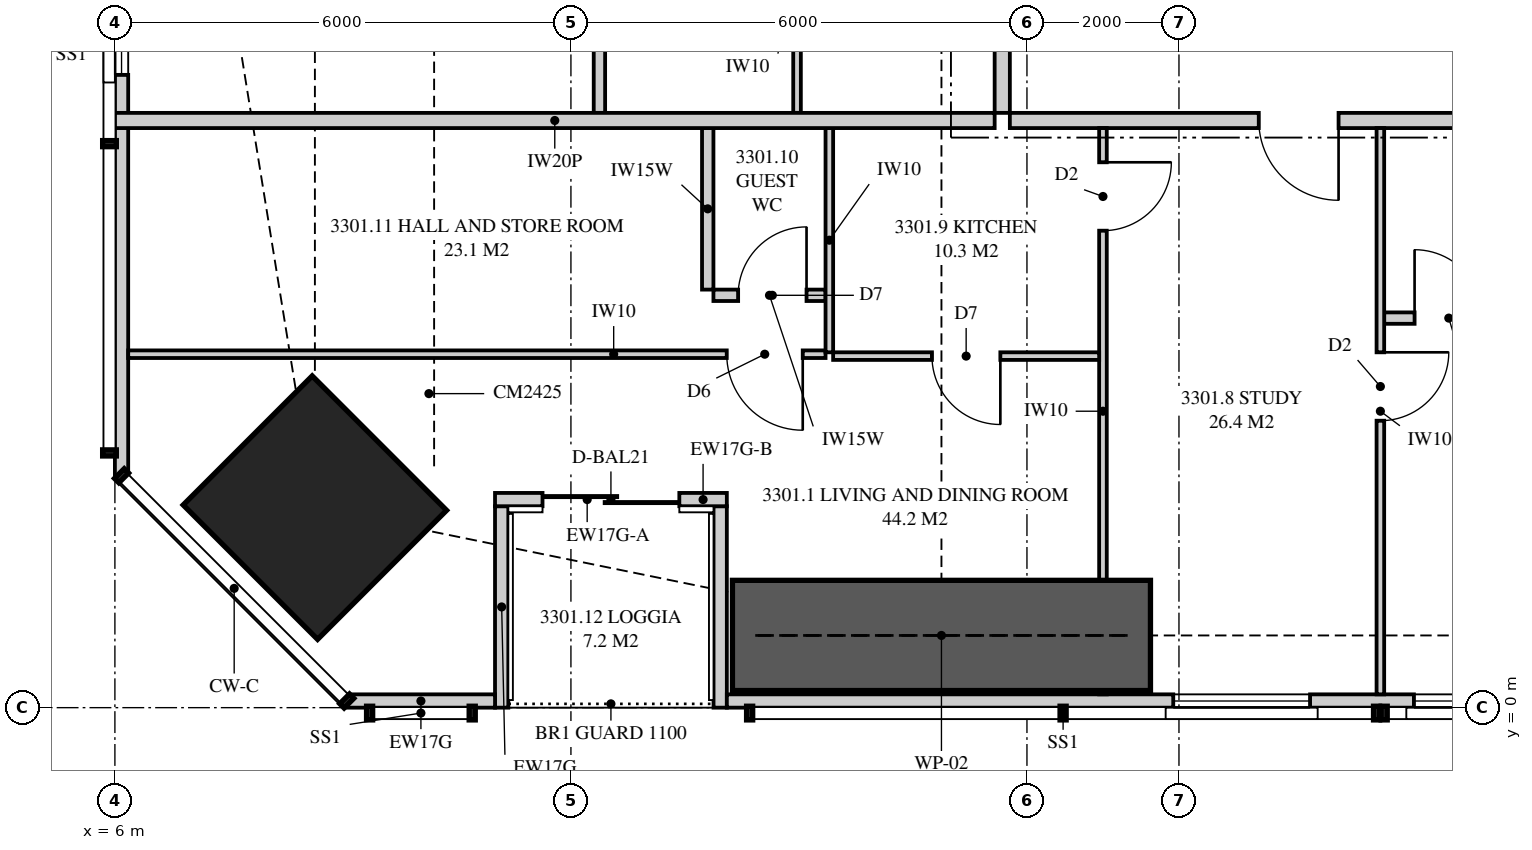
"""IFC4 building model, lengths in metres.
Left out: names, types, materials, properties, quantities, classifications, styles, units other than length and angle.
Written with IfcOpenShell. Run it as: python <this file> out.ifc"""

import sys

from ifc_helpers import new_model, si_unit, direction, frame, frame_2d, origin, origin_2d, place, context, subcontext, project, spatial, polyline, rectangle, outline, extrude, element, fill, save


model = new_model("IFC4")
c1 = context("Model", 3, precision=1e-05, world=origin(), true_north=direction((0.0, 1.0)))
c2 = subcontext(c1, "Body", "Model", "MODEL_VIEW")
j1 = project(units=[si_unit("LENGTHUNIT", "METRE"), si_unit("PLANEANGLEUNIT", "RADIAN")], contexts=[c1])
p1 = place(None, origin())
s1 = spatial("IfcSite", under=j1, at=p1, CompositionType="ELEMENT")
p2 = place(p1, origin())
s2 = spatial("IfcBuilding", under=s1, at=p2, CompositionType="ELEMENT")
p3 = place(p2, frame((0.0, 0.0, 121.6)))
s3 = spatial("IfcBuildingStorey", under=s2, at=p3, CompositionType="ELEMENT", Elevation=121.6)
p4 = place(p3, frame((8.631, 2.631, 0.0), z_axis=(0.0, 0.0, 1.0), x_axis=(0.707106781187, 0.707106781187, 0.0)))
e1 = element("IfcColumn", 1, at=p4, inside=s3, PredefinedType="COLUMN", context=c2, shape_type="SweptSolid", body=[
    extrude(rectangle(XDim=2.4, YDim=2.5, at=origin_2d()), origin(), (0.0, 0.0, 1.0), 3.35),
])
p5 = place(p3, frame((9.051, 0.087, 0.0), z_axis=(0.0, 0.0, 1.0), x_axis=(1.0, 0.0, 0.0)))
e2 = element("IfcWall", 2, at=p5, inside=s3, PredefinedType="SOLIDWALL", context=c2, shape_type="SweptSolid", body=[
    extrude(rectangle(XDim=1.95, YDim=0.175, at=frame_2d((0.975, 0.0))), origin(), (0.0, 0.0, 1.0), 3.11),
])
p6 = place(p3, frame((14.051, 0.087, 0.0), z_axis=(0.0, 0.0, 1.0), x_axis=(1.0, 0.0, 0.0)))
e3 = element("IfcWall", 3, at=p6, inside=s3, PredefinedType="SOLIDWALL", context=c2, shape_type="SweptSolid", body=[
    extrude(outline(polyline([(0.0, 0.0), (27.374, 0.0), (27.374, 3.11), (24.777, 3.11), (24.777, 2.15), (24.732, 2.15), (24.732, 3.11), (24.574, 3.11), (24.574, 2.15), (2.824, 2.15), (2.824, 3.11), (2.666, 3.11), (2.666, 2.15), (2.62, 2.15), (2.62, 3.11), (0.0, 3.11), (0.0, 0.0)])), frame((0.0, 0.087, 0.0), z_axis=(0.0, -1.0, 0.0), x_axis=(1.0, 0.0, 0.0)), (0.0, 0.0, 1.0), 0.175),
])
p7 = place(p6, frame((5.874, 0.0, 0.4)))
e4 = element("IfcOpeningElement", 4, at=p7, cuts=e3, PredefinedType="OPENING", context=c2, shape_type="SweptSolid", body=[
    extrude(rectangle(XDim=1.8, YDim=1.7, at=frame_2d((0.9, 0.85))), frame((0.0, 0.097, 0.0), z_axis=(0.0, -1.0, 0.0), x_axis=(1.0, 0.0, 0.0)), (0.0, 0.0, 1.0), 0.195),
])
p8 = place(p6, frame((9.04, 0.0, 0.4)))
e5 = element("IfcOpeningElement", 5, at=p8, cuts=e3, PredefinedType="OPENING", context=c2, shape_type="SweptSolid", body=[
    extrude(rectangle(XDim=1.8, YDim=1.7, at=frame_2d((0.9, 0.85))), frame((0.0, 0.097, 0.0), z_axis=(0.0, -1.0, 0.0), x_axis=(1.0, 0.0, 0.0)), (0.0, 0.0, 1.0), 0.195),
])
p9 = place(p6, frame((16.564, 0.0, 0.4)))
e6 = element("IfcOpeningElement", 6, at=p9, cuts=e3, PredefinedType="OPENING", context=c2, shape_type="SweptSolid", body=[
    extrude(rectangle(XDim=1.8, YDim=1.7, at=frame_2d((0.9, 0.85))), frame((0.0, 0.097, 0.0), z_axis=(0.0, -1.0, 0.0), x_axis=(1.0, 0.0, 0.0)), (0.0, 0.0, 1.0), 0.195),
])
p10 = place(p6, frame((19.889, 0.0, 0.4)))
e7 = element("IfcOpeningElement", 7, at=p10, cuts=e3, PredefinedType="OPENING", context=c2, shape_type="SweptSolid", body=[
    extrude(rectangle(XDim=1.8, YDim=1.7, at=frame_2d((0.9, 0.85))), frame((0.0, 0.097, 0.0), z_axis=(0.0, -1.0, 0.0), x_axis=(1.0, 0.0, 0.0)), (0.0, 0.0, 1.0), 0.195),
])
p11 = place(p3, frame((11.001, 2.738, 0.0), z_axis=(0.0, 0.0, 1.0), x_axis=(1.0, 0.0, 0.0)))
e8 = element("IfcWall", 8, at=p11, inside=s3, PredefinedType="SOLIDWALL", context=c2, shape_type="SweptSolid", body=[
    extrude(rectangle(XDim=2.425, YDim=0.175, at=frame_2d((1.212, 0.0))), origin(), (0.0, 0.0, 1.0), 2.15),
])
p12 = place(p11, frame((0.625, 0.0, 0.0)))
e9 = element("IfcOpeningElement", 9, at=p12, cuts=e8, PredefinedType="OPENING", context=c2, shape_type="SweptSolid", body=[
    extrude(rectangle(XDim=1.8, YDim=2.1, at=frame_2d((0.9, 1.05))), frame((0.0, 0.097, 0.0), z_axis=(0.0, -1.0, 0.0), x_axis=(1.0, 0.0, 0.0)), (0.0, 0.0, 1.0), 0.195),
])
p13 = place(p3, frame((13.426, 2.738, 0.0), z_axis=(0.0, 0.0, 1.0), x_axis=(1.0, 0.0, 0.0)))
e10 = element("IfcWall", 10, at=p13, inside=s3, PredefinedType="SOLIDWALL", context=c2, shape_type="SweptSolid", body=[
    extrude(rectangle(XDim=0.625, YDim=0.175, at=frame_2d((0.312, 0.0))), origin(), (0.0, 0.0, 1.0), 3.11),
])
p14 = place(p3, frame((11.089, 0.0, 0.0), z_axis=(0.0, 0.0, 1.0), x_axis=(0.0, 1.0, 0.0)))
e11 = element("IfcWall", 11, at=p14, inside=s3, PredefinedType="SOLIDWALL", context=c2, shape_type="SweptSolid", body=[
    extrude(outline(polyline([(0.0, 0.0), (2.65, 0.0), (2.65, 2.15), (1.296, 2.15), (1.296, 3.11), (0.0, 3.11), (0.0, 0.0)])), frame((0.0, 0.087, 0.0), z_axis=(0.0, -1.0, 0.0), x_axis=(1.0, 0.0, 0.0)), (0.0, 0.0, 1.0), 0.175),
])
p15 = place(p3, frame((13.964, 0.0, 0.0), z_axis=(0.0, 0.0, 1.0), x_axis=(0.0, 1.0, 0.0)))
e12 = element("IfcWall", 12, at=p15, inside=s3, PredefinedType="SOLIDWALL", context=c2, shape_type="SweptSolid", body=[
    extrude(outline(polyline([(0.0, 0.0), (2.65, 0.0), (2.65, 3.11), (2.378, 3.11), (2.378, 2.15), (0.709, 2.15), (0.709, 3.11), (0.0, 3.11), (0.0, 0.0)])), frame((0.0, 0.087, 0.0), z_axis=(0.0, -1.0, 0.0), x_axis=(1.0, 0.0, 0.0)), (0.0, 0.0, 1.0), 0.175),
])
p16 = place(p3, frame((6.087, 17.358, 0.0), z_axis=(0.0, 0.0, 1.0), x_axis=(0.0, -1.0, 0.0)))
e13 = element("IfcWall", 13, at=p16, inside=s3, PredefinedType="SOLIDWALL", context=c2, shape_type="SweptSolid", body=[
    extrude(outline(polyline([(0.0, 0.0), (14.307, 0.0), (14.307, 3.11), (4.577, 3.11), (4.577, 2.15), (4.484, 2.15), (4.484, 3.11), (4.358, 3.11), (4.358, 2.15), (0.0, 2.15), (0.0, 0.0)])), frame((0.0, 0.087, 0.0), z_axis=(0.0, -1.0, 0.0), x_axis=(1.0, 0.0, 0.0)), (0.0, 0.0, 1.0), 0.175),
])
p17 = place(p16, frame((0.3, 0.0, 0.4)))
e14 = element("IfcOpeningElement", 14, at=p17, cuts=e13, PredefinedType="OPENING", context=c2, shape_type="SweptSolid", body=[
    extrude(rectangle(XDim=1.2, YDim=1.7, at=frame_2d((0.6, 0.85))), frame((0.0, 0.097, 0.0), z_axis=(0.0, -1.0, 0.0), x_axis=(1.0, 0.0, 0.0)), (0.0, 0.0, 1.0), 0.195),
])
p18 = place(p16, frame((7.233, 0.0, 0.4)))
e15 = element("IfcOpeningElement", 15, at=p18, cuts=e13, PredefinedType="OPENING", context=c2, shape_type="SweptSolid", body=[
    extrude(rectangle(XDim=1.8, YDim=1.7, at=frame_2d((0.9, 0.85))), frame((0.0, 0.097, 0.0), z_axis=(0.0, -1.0, 0.0), x_axis=(1.0, 0.0, 0.0)), (0.0, 0.0, 1.0), 0.195),
])
p19 = place(p3, frame((17.775, 7.725, 0.0), z_axis=(0.0, 0.0, 1.0), x_axis=(1.0, 0.0, 0.0)))
e16 = element("IfcWall", 16, at=p19, inside=s3, PredefinedType="PARTITIONING", context=c2, shape_type="SweptSolid", body=[
    extrude(outline(polyline([(0.0, 0.0), (19.225, 0.0), (19.225, 3.11), (10.312, 3.11), (10.312, 2.541), (9.638, 2.541), (9.638, 3.11), (0.0, 3.11), (0.0, 0.0)])), frame((0.0, 0.1, 0.0), z_axis=(0.0, -1.0, 0.0), x_axis=(1.0, 0.0, 0.0)), (0.0, 0.0, 1.0), 0.2),
])
p20 = place(p19, frame((3.275, 0.0, 0.0)))
e17 = element("IfcOpeningElement", 17, at=p20, cuts=e16, PredefinedType="OPENING", context=c2, shape_type="SweptSolid", body=[
    extrude(rectangle(XDim=1.05, YDim=2.2, at=frame_2d((0.525, 1.1))), frame((0.0, 0.11, 0.0), z_axis=(0.0, -1.0, 0.0), x_axis=(1.0, 0.0, 0.0)), (0.0, 0.0, 1.0), 0.22),
])
p21 = place(p3, frame((22.65, 0.175, 0.0), z_axis=(0.0, 0.0, 1.0), x_axis=(0.0, 1.0, 0.0)))
e18 = element("IfcWall", 18, at=p21, inside=s3, PredefinedType="PARTITIONING", context=c2, shape_type="SweptSolid", body=[
    extrude(outline(polyline([(0.0, 0.0), (7.45, 0.0), (7.45, 3.11), (1.635, 3.11), (1.635, 2.15), (0.0, 2.15), (0.0, 3.11), (0.0, 0.0)])), frame((0.0, 0.05, 0.0), z_axis=(0.0, -1.0, 0.0), x_axis=(1.0, 0.0, 0.0)), (0.0, 0.0, 1.0), 0.1),
])
p22 = place(p21, frame((3.6, 0.0, 0.0)))
e19 = element("IfcOpeningElement", 19, at=p22, cuts=e18, PredefinedType="OPENING", context=c2, shape_type="SweptSolid", body=[
    extrude(rectangle(XDim=0.9, YDim=2.1, at=frame_2d((0.45, 1.05))), frame((0.0, 0.06, 0.0), z_axis=(0.0, -1.0, 0.0), x_axis=(1.0, 0.0, 0.0)), (0.0, 0.0, 1.0), 0.12),
])
p23 = place(p3, frame((22.7, 5.125, 0.0), z_axis=(0.0, 0.0, 1.0), x_axis=(1.0, 0.0, 0.0)))
e20 = element("IfcWall", 20, at=p23, inside=s3, PredefinedType="PLUMBINGWALL", context=c2, shape_type="SweptSolid", body=[
    extrude(rectangle(XDim=4.15, YDim=0.15, at=frame_2d((2.075, 0.0))), origin(), (0.0, 0.0, 1.0), 3.11),
])
p24 = place(p23, frame((0.4, 0.0, 0.0)))
e21 = element("IfcOpeningElement", 21, at=p24, cuts=e20, PredefinedType="OPENING", context=c2, shape_type="SweptSolid", body=[
    extrude(rectangle(XDim=0.9, YDim=2.1, at=frame_2d((0.45, 1.05))), frame((0.0, 0.085, 0.0), z_axis=(0.0, -1.0, 0.0), x_axis=(1.0, 0.0, 0.0)), (0.0, 0.0, 1.0), 0.17),
])
p25 = place(p3, frame((19.0, 0.175, 0.0), z_axis=(0.0, 0.0, 1.0), x_axis=(0.0, 1.0, 0.0)))
e22 = element("IfcWall", 22, at=p25, inside=s3, PredefinedType="PARTITIONING", context=c2, shape_type="SweptSolid", body=[
    extrude(outline(polyline([(0.529, 2.15), (0.0, 2.15), (0.0, 0.0), (0.529, 0.0), (0.529, 0.017), (1.021, 0.017), (1.021, 0.0), (7.45, 0.0), (7.45, 3.11), (1.635, 3.11), (1.635, 2.15), (1.021, 2.15), (1.021, 2.133), (0.529, 2.133), (0.529, 2.15)])), frame((0.0, 0.05, 0.0), z_axis=(0.0, -1.0, 0.0), x_axis=(1.0, 0.0, 0.0)), (0.0, 0.0, 1.0), 0.1),
])
p26 = place(p25, frame((6.1, 0.0, 0.0)))
e23 = element("IfcOpeningElement", 23, at=p26, cuts=e22, PredefinedType="OPENING", context=c2, shape_type="SweptSolid", body=[
    extrude(rectangle(XDim=0.9, YDim=2.1, at=frame_2d((0.45, 1.05))), frame((0.0, 0.06, 0.0), z_axis=(0.0, -1.0, 0.0), x_axis=(1.0, 0.0, 0.0)), (0.0, 0.0, 1.0), 0.12),
])
p27 = place(p3, frame((15.45, 4.625, 0.0), z_axis=(0.0, 0.0, 1.0), x_axis=(1.0, 0.0, 0.0)))
e24 = element("IfcWall", 24, at=p27, inside=s3, PredefinedType="PARTITIONING", context=c2, shape_type="SweptSolid", body=[
    extrude(outline(polyline([(0.0, 0.0), (3.5, 0.0), (3.5, 3.11), (1.712, 3.11), (1.712, 2.541), (1.138, 2.541), (1.138, 3.11), (0.0, 3.11), (0.0, 0.0)])), frame((0.0, 0.05, 0.0), z_axis=(0.0, -1.0, 0.0), x_axis=(1.0, 0.0, 0.0)), (0.0, 0.0, 1.0), 0.1),
])
p28 = place(p27, frame((1.3, 0.0, 0.0)))
e25 = element("IfcOpeningElement", 25, at=p28, cuts=e24, PredefinedType="OPENING", context=c2, shape_type="SweptSolid", body=[
    extrude(rectangle(XDim=0.9, YDim=2.1, at=frame_2d((0.45, 1.05))), frame((0.0, 0.06, 0.0), z_axis=(0.0, -1.0, 0.0), x_axis=(1.0, 0.0, 0.0)), (0.0, 0.0, 1.0), 0.12),
])
p29 = place(p3, frame((15.4, 4.675, 0.0), z_axis=(0.0, 0.0, 1.0), x_axis=(0.0, 1.0, 0.0)))
e26 = element("IfcWall", 26, at=p29, inside=s3, PredefinedType="PARTITIONING", context=c2, shape_type="SweptSolid", body=[
    extrude(rectangle(XDim=2.95, YDim=0.1, at=frame_2d((1.475, 0.0))), origin(), (0.0, 0.0, 1.0), 3.11),
])
p30 = place(p3, frame((13.875, 5.425, 0.0), z_axis=(0.0, 0.0, 1.0), x_axis=(1.0, 0.0, 0.0)))
e27 = element("IfcWall", 27, at=p30, inside=s3, PredefinedType="PLUMBINGWALL", context=c2, shape_type="SweptSolid", body=[
    extrude(rectangle(XDim=1.475, YDim=0.15, at=frame_2d((0.738, 0.0))), origin(), (0.0, 0.0, 1.0), 3.11),
])
p31 = place(p30, frame((0.325, 0.0, 0.0)))
e28 = element("IfcOpeningElement", 28, at=p31, cuts=e27, PredefinedType="OPENING", context=c2, shape_type="SweptSolid", body=[
    extrude(rectangle(XDim=0.9, YDim=2.1, at=frame_2d((0.45, 1.05))), frame((0.0, 0.085, 0.0), z_axis=(0.0, -1.0, 0.0), x_axis=(1.0, 0.0, 0.0)), (0.0, 0.0, 1.0), 0.17),
])
p32 = place(p3, frame((13.8, 5.5, 0.0), z_axis=(0.0, 0.0, 1.0), x_axis=(0.0, 1.0, 0.0)))
e29 = element("IfcWall", 29, at=p32, inside=s3, PredefinedType="PLUMBINGWALL", context=c2, shape_type="SweptSolid", body=[
    extrude(rectangle(XDim=2.125, YDim=0.15, at=frame_2d((1.062, 0.0))), origin(), (0.0, 0.0, 1.0), 3.11),
])
p33 = place(p3, frame((6.175, 4.65, 0.0), z_axis=(0.0, 0.0, 1.0), x_axis=(1.0, 0.0, 0.0)))
e30 = element("IfcWall", 30, at=p33, inside=s3, PredefinedType="PARTITIONING", context=c2, shape_type="SweptSolid", body=[
    extrude(outline(polyline([(0.0, 0.0), (9.175, 0.0), (9.175, 3.11), (5.285, 3.11), (5.285, 2.51), (3.0, 2.51), (3.0, 2.15), (1.258, 2.15), (1.258, 3.11), (0.0, 3.11), (0.0, 0.0)])), frame((0.0, 0.05, 0.0), z_axis=(0.0, -1.0, 0.0), x_axis=(1.0, 0.0, 0.0)), (0.0, 0.0, 1.0), 0.1),
])
p34 = place(p33, frame((7.875, 0.0, 0.0)))
e31 = element("IfcOpeningElement", 31, at=p34, cuts=e30, PredefinedType="OPENING", context=c2, shape_type="SweptSolid", body=[
    extrude(rectangle(XDim=1.0, YDim=2.1, at=frame_2d((0.5, 1.05))), frame((0.0, 0.06, 0.0), z_axis=(0.0, -1.0, 0.0), x_axis=(1.0, 0.0, 0.0)), (0.0, 0.0, 1.0), 0.12),
])
p35 = place(p3, frame((6.0, 7.725, 0.0), z_axis=(0.0, 0.0, 1.0), x_axis=(1.0, 0.0, 0.0)))
e32 = element("IfcWall", 32, at=p35, inside=s3, PredefinedType="PARTITIONING", context=c2, shape_type="SweptSolid", body=[
    extrude(outline(polyline([(0.0, 0.0), (11.575, 0.0), (11.575, 3.11), (11.212, 3.11), (11.212, 2.541), (10.538, 2.541), (10.538, 3.11), (5.51, 3.11), (5.51, 2.51), (2.969, 2.51), (2.969, 2.541), (2.727, 2.541), (2.727, 2.15), (0.884, 2.15), (0.884, 3.11), (0.0, 3.11), (0.0, 0.0)])), frame((0.0, 0.1, 0.0), z_axis=(0.0, -1.0, 0.0), x_axis=(1.0, 0.0, 0.0)), (0.0, 0.0, 1.0), 0.2),
])
p36 = place(p3, frame((17.675, 7.825, 0.0), z_axis=(0.0, 0.0, 1.0), x_axis=(0.0, 1.0, 0.0)))
e33 = element("IfcWall", 33, at=p36, inside=s3, PredefinedType="PARTITIONING", context=c2, shape_type="SweptSolid", body=[
    extrude(outline(polyline([(0.0, 0.0), (9.075, 0.0), (9.075, 3.11), (3.087, 3.11), (3.087, 2.541), (2.413, 2.541), (2.413, 3.11), (0.0, 3.11), (0.0, 0.0)])), frame((0.0, 0.1, 0.0), z_axis=(0.0, -1.0, 0.0), x_axis=(1.0, 0.0, 0.0)), (0.0, 0.0, 1.0), 0.2),
])
p37 = place(p3, frame((12.375, 7.825, 0.0), z_axis=(0.0, 0.0, 1.0), x_axis=(0.0, 1.0, 0.0)))
e34 = element("IfcWall", 34, at=p37, inside=s3, PredefinedType="PLUMBINGWALL", context=c2, shape_type="SweptSolid", body=[
    extrude(outline(polyline([(0.0, 0.0), (3.45, 0.0), (3.45, 3.11), (3.062, 3.11), (3.062, 2.541), (2.438, 2.541), (2.438, 3.11), (0.0, 3.11), (0.0, 0.0)])), frame((0.0, 0.075, 0.0), z_axis=(0.0, -1.0, 0.0), x_axis=(1.0, 0.0, 0.0)), (0.0, 0.0, 1.0), 0.15),
])
p38 = place(p3, frame((14.975, 7.825, 0.0), z_axis=(0.0, 0.0, 1.0), x_axis=(0.0, 1.0, 0.0)))
e35 = element("IfcWall", 35, at=p38, inside=s3, PredefinedType="PARTITIONING", context=c2, shape_type="SweptSolid", body=[
    extrude(outline(polyline([(0.0, 0.0), (3.45, 0.0), (3.45, 3.11), (3.037, 3.11), (3.037, 2.541), (2.463, 2.541), (2.463, 3.11), (0.0, 3.11), (0.0, 0.0)])), frame((0.0, 0.05, 0.0), z_axis=(0.0, -1.0, 0.0), x_axis=(1.0, 0.0, 0.0)), (0.0, 0.0, 1.0), 0.1),
])
p39 = place(p3, frame((14.125, 0.95, 0.0), z_axis=(0.0, 0.0, 1.0), x_axis=(1.0, 0.0, 0.0)))
e36 = element("IfcWall", 36, at=p39, inside=s3, PredefinedType="SHEAR", context=c2, shape_type="SweptSolid", body=[
    extrude(rectangle(XDim=5.5, YDim=1.45, at=frame_2d((2.75, 0.0))), origin(), (0.0, 0.0, 1.0), 3.35),
])
p40 = place(p12, origin())
e37 = element("IfcDoor", 37, at=p40, inside=s3, OperationType="SLIDING_TO_LEFT", PredefinedType="DOOR", context=c2, shape_type="SweptSolid", body=[
    extrude(rectangle(XDim=1.8, YDim=2.1, at=frame_2d((0.9, 1.05))), frame((0.0, 0.025, 0.0), z_axis=(0.0, -1.0, 0.0), x_axis=(1.0, 0.0, 0.0)), (0.0, 0.0, 1.0), 0.05),
])
fill(e9, e37)
p41 = place(p7, origin())
e38 = element("IfcWindow", 38, at=p41, inside=s3, PartitioningType="SINGLE_PANEL", PredefinedType="WINDOW", context=c2, shape_type="SweptSolid", body=[
    extrude(rectangle(XDim=1.8, YDim=1.7, at=frame_2d((0.9, 0.85))), frame((0.0, 0.03, 0.0), z_axis=(0.0, -1.0, 0.0), x_axis=(1.0, 0.0, 0.0)), (0.0, 0.0, 1.0), 0.06),
])
fill(e4, e38)
p42 = place(p8, origin())
e39 = element("IfcWindow", 39, at=p42, inside=s3, PartitioningType="SINGLE_PANEL", PredefinedType="WINDOW", context=c2, shape_type="SweptSolid", body=[
    extrude(rectangle(XDim=1.8, YDim=1.7, at=frame_2d((0.9, 0.85))), frame((0.0, 0.03, 0.0), z_axis=(0.0, -1.0, 0.0), x_axis=(1.0, 0.0, 0.0)), (0.0, 0.0, 1.0), 0.06),
])
fill(e5, e39)
p43 = place(p18, origin())
e40 = element("IfcWindow", 40, at=p43, inside=s3, PartitioningType="SINGLE_PANEL", PredefinedType="WINDOW", context=c2, shape_type="SweptSolid", body=[
    extrude(rectangle(XDim=1.8, YDim=1.7, at=frame_2d((0.9, 0.85))), frame((0.0, 0.03, 0.0), z_axis=(0.0, -1.0, 0.0), x_axis=(1.0, 0.0, 0.0)), (0.0, 0.0, 1.0), 0.06),
])
fill(e15, e40)
p44 = place(p20, frame((1.05, 0.0, 0.0), z_axis=(0.0, 0.0, 1.0), x_axis=(-1.0, 0.0, 0.0)))
e41 = element("IfcDoor", 41, at=p44, inside=s3, OperationType="SINGLE_SWING_LEFT", PredefinedType="DOOR", context=c2, shape_type="SweptSolid", body=[
    extrude(rectangle(XDim=1.05, YDim=2.2, at=frame_2d((0.525, 1.1))), frame((0.0, 0.025, 0.0), z_axis=(0.0, -1.0, 0.0), x_axis=(1.0, 0.0, 0.0)), (0.0, 0.0, 1.0), 0.05),
])
fill(e17, e41)
p45 = place(p22, frame((0.9, 0.0, 0.0), z_axis=(0.0, 0.0, 1.0), x_axis=(-1.0, 0.0, 0.0)))
e42 = element("IfcDoor", 42, at=p45, inside=s3, OperationType="SINGLE_SWING_LEFT", PredefinedType="DOOR", context=c2, shape_type="SweptSolid", body=[
    extrude(rectangle(XDim=0.9, YDim=2.1, at=frame_2d((0.45, 1.05))), frame((0.0, 0.025, 0.0), z_axis=(0.0, -1.0, 0.0), x_axis=(1.0, 0.0, 0.0)), (0.0, 0.0, 1.0), 0.05),
])
fill(e19, e42)
p46 = place(p24, origin())
e43 = element("IfcDoor", 43, at=p46, inside=s3, OperationType="SINGLE_SWING_LEFT", PredefinedType="DOOR", context=c2, shape_type="SweptSolid", body=[
    extrude(rectangle(XDim=0.9, YDim=2.1, at=frame_2d((0.45, 1.05))), frame((0.0, 0.025, 0.0), z_axis=(0.0, -1.0, 0.0), x_axis=(1.0, 0.0, 0.0)), (0.0, 0.0, 1.0), 0.05),
])
fill(e21, e43)
p47 = place(p26, frame((0.9, 0.0, 0.0), z_axis=(0.0, 0.0, 1.0), x_axis=(-1.0, 0.0, 0.0)))
e44 = element("IfcDoor", 44, at=p47, inside=s3, OperationType="SINGLE_SWING_LEFT", PredefinedType="DOOR", context=c2, shape_type="SweptSolid", body=[
    extrude(rectangle(XDim=0.9, YDim=2.1, at=frame_2d((0.45, 1.05))), frame((0.0, 0.025, 0.0), z_axis=(0.0, -1.0, 0.0), x_axis=(1.0, 0.0, 0.0)), (0.0, 0.0, 1.0), 0.05),
])
fill(e23, e44)
p48 = place(p28, frame((0.9, 0.0, 0.0), z_axis=(0.0, 0.0, 1.0), x_axis=(-1.0, 0.0, 0.0)))
e45 = element("IfcDoor", 45, at=p48, inside=s3, OperationType="SINGLE_SWING_LEFT", PredefinedType="DOOR", context=c2, shape_type="SweptSolid", body=[
    extrude(rectangle(XDim=0.9, YDim=2.1, at=frame_2d((0.45, 1.05))), frame((0.0, 0.025, 0.0), z_axis=(0.0, -1.0, 0.0), x_axis=(1.0, 0.0, 0.0)), (0.0, 0.0, 1.0), 0.05),
])
fill(e25, e45)
p49 = place(p31, origin())
e46 = element("IfcDoor", 46, at=p49, inside=s3, OperationType="SINGLE_SWING_RIGHT", PredefinedType="DOOR", context=c2, shape_type="SweptSolid", body=[
    extrude(rectangle(XDim=0.9, YDim=2.1, at=frame_2d((0.45, 1.05))), frame((0.0, 0.025, 0.0), z_axis=(0.0, -1.0, 0.0), x_axis=(1.0, 0.0, 0.0)), (0.0, 0.0, 1.0), 0.05),
])
fill(e28, e46)
p50 = place(p34, frame((1.0, 0.0, 0.0), z_axis=(0.0, 0.0, 1.0), x_axis=(-1.0, 0.0, 0.0)))
e47 = element("IfcDoor", 47, at=p50, inside=s3, OperationType="SINGLE_SWING_LEFT", PredefinedType="DOOR", context=c2, shape_type="SweptSolid", body=[
    extrude(rectangle(XDim=1.0, YDim=2.1, at=frame_2d((0.5, 1.05))), frame((0.0, 0.025, 0.0), z_axis=(0.0, -1.0, 0.0), x_axis=(1.0, 0.0, 0.0)), (0.0, 0.0, 1.0), 0.05),
])
fill(e31, e47)
save(model, sys.argv[1])
